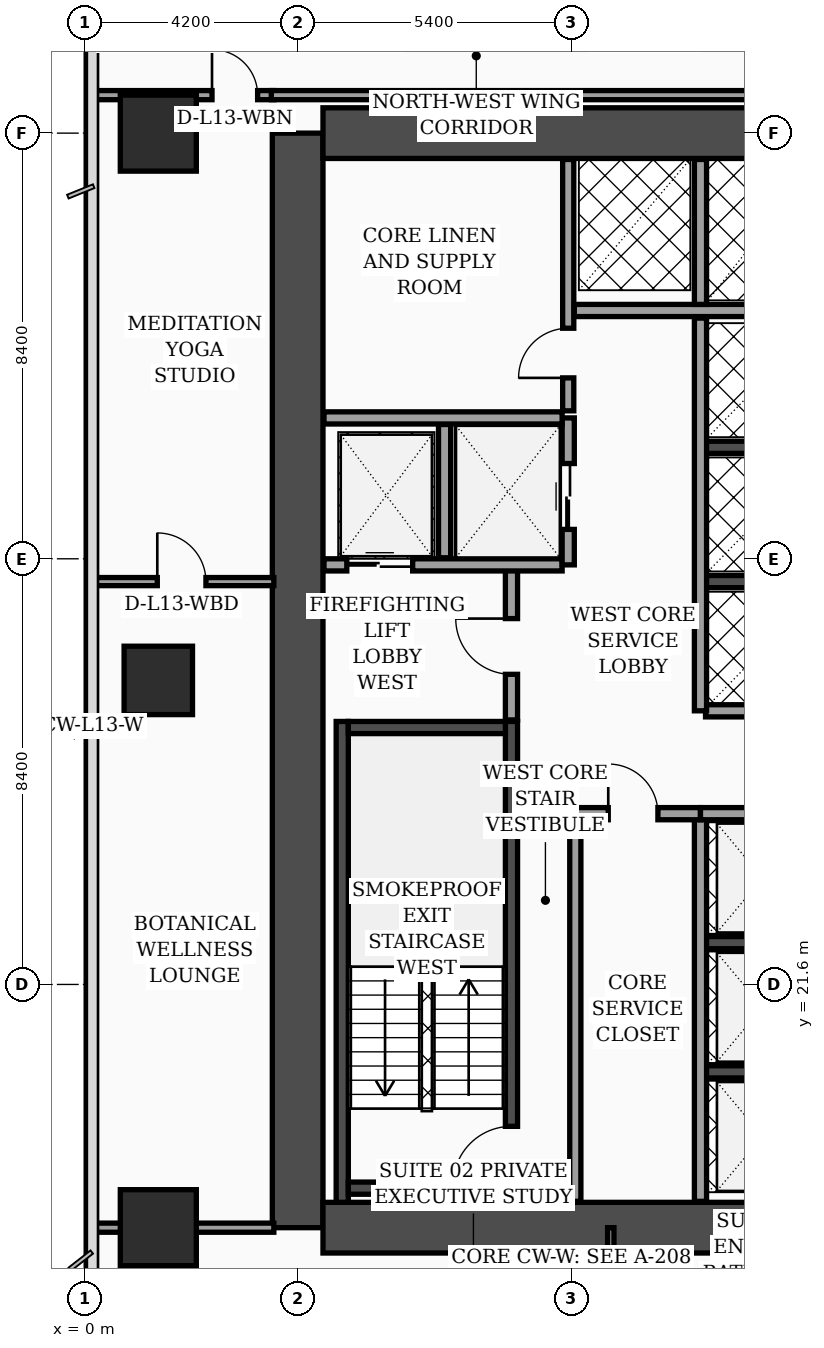
"""IFC4 building model, lengths in metres.
Left out: names, types, materials, properties, quantities, classifications, styles, units other than length and angle.
Written with IfcOpenShell. Run it as: python <this file> out.ifc"""

import sys

from ifc_helpers import new_model, si_unit, direction, frame, frame_2d, origin, origin_2d, place, context, subcontext, project, spatial, rectangle, extrude, element, fill, save


model = new_model("IFC4")
c1 = context("Model", 3, precision=1e-05, world=origin(), true_north=direction((0.0, 1.0)))
c2 = subcontext(c1, "Body", "Model", "MODEL_VIEW")
j1 = project(units=[si_unit("LENGTHUNIT", "METRE"), si_unit("PLANEANGLEUNIT", "RADIAN")], contexts=[c1])
p1 = place(None, origin())
s1 = spatial("IfcSite", under=j1, at=p1, CompositionType="ELEMENT")
p2 = place(p1, origin())
s2 = spatial("IfcBuilding", under=s1, at=p2, CompositionType="ELEMENT")
p3 = place(p2, frame((0.0, 0.0, 58.4)))
s3 = spatial("IfcBuildingStorey", under=s2, at=p3, CompositionType="ELEMENT", Elevation=58.4)
p4 = place(p3, frame((4.2, 16.8, 0.0), z_axis=(0.0, 0.0, 1.0), x_axis=(0.0, 1.0, 0.0)))
e1 = element("IfcWall", 1, at=p4, inside=s3, PredefinedType="SHEAR", context=c2, shape_type="SweptSolid", body=[
    extrude(rectangle(XDim=21.6, YDim=1.0, at=frame_2d((10.8, 0.0))), origin(), (0.0, 0.0, 1.0), 3.56),
])
for number, where, z_axis, x_axis in (
    (2, (4.7, 38.4, 0.0), (0.0, 0.0, 1.0), (1.0, 0.0, 0.0)),
    (3, (4.7, 16.8, 0.0), (0.0, 0.0, 1.0), (1.0, 0.0, 0.0)),
):
    element("IfcWall", number, at=place(p3, frame(where, z_axis=z_axis, x_axis=x_axis)), inside=s3, PredefinedType="SHEAR", context=c2, shape_type="SweptSolid", body=[
        extrude(rectangle(XDim=9.8, YDim=1.0, at=frame_2d((4.9, 0.0))), origin(), (0.0, 0.0, 1.0), 3.56),
    ])
p5 = place(p3, frame((5.08, 17.3, 0.0), z_axis=(0.0, 0.0, 1.0), x_axis=(0.0, 1.0, 0.0)))
e4 = element("IfcWall", 4, at=p5, inside=s3, PredefinedType="SOLIDWALL", context=c2, shape_type="SweptSolid", body=[
    extrude(rectangle(XDim=9.49, YDim=0.24, at=frame_2d((4.745, 0.0))), origin(), (0.0, 0.0, 1.0), 3.56),
])
p6 = place(p3, frame((8.42, 17.3, 0.0), z_axis=(0.0, 0.0, 1.0), x_axis=(0.0, 1.0, 0.0)))
e5 = element("IfcWall", 5, at=p6, inside=s3, PredefinedType="SOLIDWALL", context=c2, shape_type="SweptSolid", body=[
    extrude(rectangle(XDim=9.49, YDim=0.24, at=frame_2d((4.745, 0.0))), origin(), (0.0, 0.0, 1.0), 3.56),
])
p7 = place(p6, frame((0.35, 0.0, 0.0)))
e6 = element("IfcOpeningElement", 6, at=p7, cuts=e5, PredefinedType="OPENING", context=c2, shape_type="SweptSolid", body=[
    extrude(rectangle(XDim=1.15, YDim=2.2, at=frame_2d((0.575, 1.1))), frame((0.0, 0.13, 0.0), z_axis=(0.0, -1.0, 0.0), x_axis=(1.0, 0.0, 0.0)), (0.0, 0.0, 1.0), 0.26),
])
for number, where, z_axis, x_axis in (
    (7, (5.2, 17.58, 0.0), (0.0, 0.0, 1.0), (1.0, 0.0, 0.0)),
    (8, (5.2, 26.67, 0.0), (0.0, 0.0, 1.0), (1.0, 0.0, 0.0)),
):
    element("IfcWall", number, at=place(p3, frame(where, z_axis=z_axis, x_axis=x_axis)), inside=s3, PredefinedType="SOLIDWALL", context=c2, shape_type="SweptSolid", body=[
        extrude(rectangle(XDim=3.1, YDim=0.24, at=frame_2d((1.55, 0.0))), origin(), (0.0, 0.0, 1.0), 3.56),
    ])
for number, where, z_axis, x_axis in (
    (9, (12.18, 19.875, 0.0), (0.0, 0.0, 1.0), (1.0, 0.0, 0.0)),
    (10, (12.18, 22.425, 0.0), (0.0, 0.0, 1.0), (1.0, 0.0, 0.0)),
    (11, (12.18, 29.55, 0.0), (0.0, 0.0, 1.0), (1.0, 0.0, 0.0)),
    (12, (12.18, 32.2, 0.0), (0.0, 0.0, 1.0), (1.0, 0.0, 0.0)),
):
    element("IfcWall", number, at=place(p3, frame(where, z_axis=z_axis, x_axis=x_axis)), inside=s3, PredefinedType="SOLIDWALL", context=c2, shape_type="SweptSolid", body=[
        extrude(rectangle(XDim=2.32, YDim=0.24, at=frame_2d((1.16, 0.0))), origin(), (0.0, 0.0, 1.0), 3.56),
    ])
p8 = place(p3, frame((1.45, 16.8, 0.0), z_axis=(0.0, 0.0, 1.0), x_axis=(1.0, 0.0, 0.0)))
e13 = element("IfcColumn", 13, at=p8, inside=s3, PredefinedType="COLUMN", context=c2, shape_type="SweptSolid", body=[
    extrude(rectangle(XDim=1.5, YDim=1.5, at=origin_2d()), origin(), (0.0, 0.0, 1.0), 3.56),
])
p9 = place(p3, frame((1.45, 27.6, 0.0), z_axis=(0.0, 0.0, 1.0), x_axis=(1.0, 0.0, 0.0)))
e14 = element("IfcColumn", 14, at=p9, inside=s3, PredefinedType="COLUMN", context=c2, shape_type="SweptSolid", body=[
    extrude(rectangle(XDim=1.35, YDim=1.35, at=origin_2d()), origin(), (0.0, 0.0, 1.0), 3.56),
])
p10 = place(p3, frame((1.45, 38.4, 0.0), z_axis=(0.0, 0.0, 1.0), x_axis=(1.0, 0.0, 0.0)))
e15 = element("IfcColumn", 15, at=p10, inside=s3, PredefinedType="COLUMN", context=c2, shape_type="SweptSolid", body=[
    extrude(rectangle(XDim=1.5, YDim=1.5, at=origin_2d()), origin(), (0.0, 0.0, 1.0), 3.56),
])
p11 = place(p3, frame((8.42, 26.82, 0.0), z_axis=(0.0, 0.0, 1.0), x_axis=(0.0, 1.0, 0.0)))
e16 = element("IfcWall", 16, at=p11, inside=s3, PredefinedType="SOLIDWALL", context=c2, shape_type="SweptSolid", body=[
    extrude(rectangle(XDim=3.0, YDim=0.24, at=frame_2d((1.5, 0.0))), origin(), (0.0, 0.0, 1.0), 3.56),
])
p12 = place(p11, frame((0.9, 0.0, 0.0)))
e17 = element("IfcOpeningElement", 17, at=p12, cuts=e16, PredefinedType="OPENING", context=c2, shape_type="SweptSolid", body=[
    extrude(rectangle(XDim=1.1, YDim=2.2, at=frame_2d((0.55, 1.1))), frame((0.0, 0.13, 0.0), z_axis=(0.0, -1.0, 0.0), x_axis=(1.0, 0.0, 0.0)), (0.0, 0.0, 1.0), 0.26),
])
p13 = place(p3, frame((4.72, 29.88, 0.0), z_axis=(0.0, 0.0, 1.0), x_axis=(1.0, 0.0, 0.0)))
e18 = element("IfcWall", 18, at=p13, inside=s3, PredefinedType="SOLIDWALL", context=c2, shape_type="SweptSolid", body=[
    extrude(rectangle(XDim=4.7, YDim=0.24, at=frame_2d((2.35, 0.0))), origin(), (0.0, 0.0, 1.0), 3.56),
])
p14 = place(p13, frame((0.45, 0.0, 0.0)))
e19 = element("IfcOpeningElement", 19, at=p14, cuts=e18, PredefinedType="OPENING", context=c2, shape_type="SweptSolid", body=[
    extrude(rectangle(XDim=1.3, YDim=2.35, at=frame_2d((0.65, 1.175))), frame((0.0, 0.13, 0.0), z_axis=(0.0, -1.0, 0.0), x_axis=(1.0, 0.0, 0.0)), (0.0, 0.0, 1.0), 0.26),
])
p15 = place(p3, frame((7.1, 30.02, 0.0), z_axis=(0.0, 0.0, 1.0), x_axis=(0.0, 1.0, 0.0)))
e20 = element("IfcWall", 20, at=p15, inside=s3, PredefinedType="SOLIDWALL", context=c2, shape_type="SweptSolid", body=[
    extrude(rectangle(XDim=2.63, YDim=0.24, at=frame_2d((1.315, 0.0))), origin(), (0.0, 0.0, 1.0), 3.56),
])
p16 = place(p3, frame((9.54, 29.88, 0.0), z_axis=(0.0, 0.0, 1.0), x_axis=(0.0, 1.0, 0.0)))
e21 = element("IfcWall", 21, at=p16, inside=s3, PredefinedType="SOLIDWALL", context=c2, shape_type="SweptSolid", body=[
    extrude(rectangle(XDim=2.9, YDim=0.24, at=frame_2d((1.45, 0.0))), origin(), (0.0, 0.0, 1.0), 3.56),
])
p17 = place(p16, frame((0.7, 0.0, 0.0)))
e22 = element("IfcOpeningElement", 22, at=p17, cuts=e21, PredefinedType="OPENING", context=c2, shape_type="SweptSolid", body=[
    extrude(rectangle(XDim=1.3, YDim=2.35, at=frame_2d((0.65, 1.175))), frame((0.0, 0.13, 0.0), z_axis=(0.0, -1.0, 0.0), x_axis=(1.0, 0.0, 0.0)), (0.0, 0.0, 1.0), 0.26),
])
p18 = place(p3, frame((4.72, 32.78, 0.0), z_axis=(0.0, 0.0, 1.0), x_axis=(1.0, 0.0, 0.0)))
e23 = element("IfcWall", 23, at=p18, inside=s3, PredefinedType="SOLIDWALL", context=c2, shape_type="SweptSolid", body=[
    extrude(rectangle(XDim=4.7, YDim=0.24, at=frame_2d((2.35, 0.0))), origin(), (0.0, 0.0, 1.0), 3.56),
])
p19 = place(p3, frame((9.68, 17.32, 0.0), z_axis=(0.0, 0.0, 1.0), x_axis=(0.0, 1.0, 0.0)))
e24 = element("IfcWall", 24, at=p19, inside=s3, PredefinedType="SOLIDWALL", context=c2, shape_type="SweptSolid", body=[
    extrude(rectangle(XDim=7.68, YDim=0.22, at=frame_2d((3.84, 0.0))), origin(), (0.0, 0.0, 1.0), 3.56),
])
p20 = place(p3, frame((9.54, 32.92, 0.0), z_axis=(0.0, 0.0, 1.0), x_axis=(0.0, 1.0, 0.0)))
e25 = element("IfcWall", 25, at=p20, inside=s3, PredefinedType="SOLIDWALL", context=c2, shape_type="SweptSolid", body=[
    extrude(rectangle(XDim=4.96, YDim=0.22, at=frame_2d((2.48, 0.0))), origin(), (0.0, 0.0, 1.0), 3.56),
])
p21 = place(p20, frame((0.65, 0.0, 0.0)))
e26 = element("IfcOpeningElement", 26, at=p21, cuts=e25, PredefinedType="OPENING", context=c2, shape_type="SweptSolid", body=[
    extrude(rectangle(XDim=0.98, YDim=2.15, at=frame_2d((0.49, 1.075))), frame((0.0, 0.12, 0.0), z_axis=(0.0, -1.0, 0.0), x_axis=(1.0, 0.0, 0.0)), (0.0, 0.0, 1.0), 0.24),
])
p22 = place(p3, frame((12.15, 17.32, 0.0), z_axis=(0.0, 0.0, 1.0), x_axis=(0.0, 1.0, 0.0)))
e27 = element("IfcWall", 27, at=p22, inside=s3, PredefinedType="SOLIDWALL", context=c2, shape_type="SweptSolid", body=[
    extrude(rectangle(XDim=7.65, YDim=0.24, at=frame_2d((3.825, 0.0))), origin(), (0.0, 0.0, 1.0), 3.56),
])
p23 = place(p3, frame((9.68, 24.97, 0.0), z_axis=(0.0, 0.0, 1.0), x_axis=(1.0, 0.0, 0.0)))
e28 = element("IfcWall", 28, at=p23, inside=s3, PredefinedType="SOLIDWALL", context=c2, shape_type="SweptSolid", body=[
    extrude(rectangle(XDim=2.47, YDim=0.24, at=frame_2d((1.235, 0.0))), origin(), (0.0, 0.0, 1.0), 3.56),
])
p24 = place(p23, frame((0.65, 0.0, 0.0)))
e29 = element("IfcOpeningElement", 29, at=p24, cuts=e28, PredefinedType="OPENING", context=c2, shape_type="SweptSolid", body=[
    extrude(rectangle(XDim=0.98, YDim=2.15, at=frame_2d((0.49, 1.075))), frame((0.0, 0.13, 0.0), z_axis=(0.0, -1.0, 0.0), x_axis=(1.0, 0.0, 0.0)), (0.0, 0.0, 1.0), 0.26),
])
p25 = place(p3, frame((12.15, 24.97, 0.0), z_axis=(0.0, 0.0, 1.0), x_axis=(1.0, 0.0, 0.0)))
e30 = element("IfcWall", 30, at=p25, inside=s3, PredefinedType="SOLIDWALL", context=c2, shape_type="SweptSolid", body=[
    extrude(rectangle(XDim=2.33, YDim=0.24, at=frame_2d((1.165, 0.0))), origin(), (0.0, 0.0, 1.0), 2.84),
])
p26 = place(p3, frame((12.25, 27.0, 0.0), z_axis=(0.0, 0.0, 1.0), x_axis=(1.0, 0.0, 0.0)))
e31 = element("IfcWall", 31, at=p26, inside=s3, PredefinedType="SOLIDWALL", context=c2, shape_type="SweptSolid", body=[
    extrude(rectangle(XDim=2.23, YDim=0.24, at=frame_2d((1.115, 0.0))), origin(), (0.0, 0.0, 1.0), 3.56),
])
p27 = place(p3, frame((12.15, 27.0, 0.0), z_axis=(0.0, 0.0, 1.0), x_axis=(0.0, 1.0, 0.0)))
e32 = element("IfcWall", 32, at=p27, inside=s3, PredefinedType="SOLIDWALL", context=c2, shape_type="SweptSolid", body=[
    extrude(rectangle(XDim=7.75, YDim=0.24, at=frame_2d((3.875, 0.0))), origin(), (0.0, 0.0, 1.0), 3.56),
])
p28 = place(p3, frame((9.66, 34.9, 0.0), z_axis=(0.0, 0.0, 1.0), x_axis=(1.0, 0.0, 0.0)))
e33 = element("IfcWall", 33, at=p28, inside=s3, PredefinedType="SOLIDWALL", context=c2, shape_type="SweptSolid", body=[
    extrude(rectangle(XDim=4.82, YDim=0.24, at=frame_2d((2.41, 0.0))), origin(), (0.0, 0.0, 1.0), 3.56),
])
p29 = place(p3, frame((12.15, 35.02, 0.0), z_axis=(0.0, 0.0, 1.0), x_axis=(0.0, 1.0, 0.0)))
e34 = element("IfcWall", 34, at=p29, inside=s3, PredefinedType="SOLIDWALL", context=c2, shape_type="SweptSolid", body=[
    extrude(rectangle(XDim=2.86, YDim=0.24, at=frame_2d((1.43, 0.0))), origin(), (0.0, 0.0, 1.0), 3.56),
])
p30 = place(p3, frame((0.08, 29.55, 0.0), z_axis=(0.0, 0.0, 1.0), x_axis=(1.0, 0.0, 0.0)))
e35 = element("IfcWall", 35, at=p30, inside=s3, PredefinedType="PARTITIONING", context=c2, shape_type="SweptSolid", body=[
    extrude(rectangle(XDim=3.65, YDim=0.16, at=frame_2d((1.825, 0.0))), origin(), (0.0, 0.0, 1.0), 3.04),
])
p31 = place(p30, frame((1.35, 0.0, 0.0)))
e36 = element("IfcOpeningElement", 36, at=p31, cuts=e35, PredefinedType="OPENING", context=c2, shape_type="SweptSolid", body=[
    extrude(rectangle(XDim=0.96, YDim=2.2, at=frame_2d((0.48, 1.1))), frame((0.0, 0.09, 0.0), z_axis=(0.0, -1.0, 0.0), x_axis=(1.0, 0.0, 0.0)), (0.0, 0.0, 1.0), 0.18),
])
p32 = place(p3, frame((0.08, 16.8, 0.0), z_axis=(0.0, 0.0, 1.0), x_axis=(1.0, 0.0, 0.0)))
e37 = element("IfcWall", 37, at=p32, inside=s3, PredefinedType="PARTITIONING", context=c2, shape_type="SweptSolid", body=[
    extrude(rectangle(XDim=3.65, YDim=0.18, at=frame_2d((1.825, 0.0))), origin(), (0.0, 0.0, 1.0), 2.84),
])
p33 = place(p3, frame((0.08, 39.15, 0.0), z_axis=(0.0, 0.0, 1.0), x_axis=(1.0, 0.0, 0.0)))
e38 = element("IfcWall", 38, at=p33, inside=s3, PredefinedType="PARTITIONING", context=c2, shape_type="SweptSolid", body=[
    extrude(rectangle(XDim=3.65, YDim=0.18, at=frame_2d((1.825, 0.0))), origin(), (0.0, 0.0, 1.0), 2.84),
])
p34 = place(p33, frame((2.43, 0.0, 0.0)))
e39 = element("IfcOpeningElement", 39, at=p34, cuts=e38, PredefinedType="OPENING", context=c2, shape_type="SweptSolid", body=[
    extrude(rectangle(XDim=0.9, YDim=2.15, at=frame_2d((0.45, 1.075))), frame((0.0, 0.1, 0.0), z_axis=(0.0, -1.0, 0.0), x_axis=(1.0, 0.0, 0.0)), (0.0, 0.0, 1.0), 0.2),
])
p35 = place(p3, frame((10.38, 14.75, 0.0), z_axis=(0.0, 0.0, 1.0), x_axis=(0.0, 1.0, 0.0)))
e40 = element("IfcWall", 40, at=p35, inside=s3, PredefinedType="PARTITIONING", context=c2, shape_type="SweptSolid", body=[
    extrude(rectangle(XDim=2.05, YDim=0.125, at=frame_2d((1.025, 0.0))), origin(), (0.0, 0.0, 1.0), 3.56),
])
p36 = place(p3, frame((3.68, 39.15, 0.0), z_axis=(0.0, 0.0, 1.0), x_axis=(1.0, 0.0, 0.0)))
e41 = element("IfcWall", 41, at=p36, inside=s3, PredefinedType="PARTITIONING", context=c2, shape_type="SweptSolid", body=[
    extrude(rectangle(XDim=11.47, YDim=0.18, at=frame_2d((5.735, 0.0))), origin(), (0.0, 0.0, 1.0), 2.84),
])
p37 = place(p12, origin())
e42 = element("IfcDoor", 42, at=p37, inside=s3, OperationType="SINGLE_SWING_RIGHT", PredefinedType="DOOR", context=c2, shape_type="SweptSolid", body=[
    extrude(rectangle(XDim=1.1, YDim=2.2, at=frame_2d((0.55, 1.1))), frame((0.0, 0.025, 0.0), z_axis=(0.0, -1.0, 0.0), x_axis=(1.0, 0.0, 0.0)), (0.0, 0.0, 1.0), 0.05),
])
fill(e17, e42)
p38 = place(p14, origin())
e43 = element("IfcDoor", 43, at=p38, inside=s3, OperationType="DOUBLE_DOOR_SLIDING", PredefinedType="DOOR", context=c2, shape_type="SweptSolid", body=[
    extrude(rectangle(XDim=1.3, YDim=2.35, at=frame_2d((0.65, 1.175))), frame((0.0, 0.025, 0.0), z_axis=(0.0, -1.0, 0.0), x_axis=(1.0, 0.0, 0.0)), (0.0, 0.0, 1.0), 0.05),
])
fill(e19, e43)
p39 = place(p17, origin())
e44 = element("IfcDoor", 44, at=p39, inside=s3, OperationType="DOUBLE_DOOR_SLIDING", PredefinedType="DOOR", context=c2, shape_type="SweptSolid", body=[
    extrude(rectangle(XDim=1.3, YDim=2.35, at=frame_2d((0.65, 1.175))), frame((0.0, 0.025, 0.0), z_axis=(0.0, -1.0, 0.0), x_axis=(1.0, 0.0, 0.0)), (0.0, 0.0, 1.0), 0.05),
])
fill(e22, e44)
p40 = place(p21, origin())
e45 = element("IfcDoor", 45, at=p40, inside=s3, OperationType="SINGLE_SWING_LEFT", PredefinedType="DOOR", context=c2, shape_type="SweptSolid", body=[
    extrude(rectangle(XDim=0.98, YDim=2.15, at=frame_2d((0.49, 1.075))), frame((0.0, 0.025, 0.0), z_axis=(0.0, -1.0, 0.0), x_axis=(1.0, 0.0, 0.0)), (0.0, 0.0, 1.0), 0.05),
])
fill(e26, e45)
p41 = place(p24, origin())
e46 = element("IfcDoor", 46, at=p41, inside=s3, OperationType="SINGLE_SWING_LEFT", PredefinedType="DOOR", context=c2, shape_type="SweptSolid", body=[
    extrude(rectangle(XDim=0.98, YDim=2.15, at=frame_2d((0.49, 1.075))), frame((0.0, 0.025, 0.0), z_axis=(0.0, -1.0, 0.0), x_axis=(1.0, 0.0, 0.0)), (0.0, 0.0, 1.0), 0.05),
])
fill(e29, e46)
p42 = place(p31, origin())
e47 = element("IfcDoor", 47, at=p42, inside=s3, OperationType="SINGLE_SWING_LEFT", PredefinedType="DOOR", context=c2, shape_type="SweptSolid", body=[
    extrude(rectangle(XDim=0.96, YDim=2.2, at=frame_2d((0.48, 1.1))), frame((0.0, 0.025, 0.0), z_axis=(0.0, -1.0, 0.0), x_axis=(1.0, 0.0, 0.0)), (0.0, 0.0, 1.0), 0.05),
])
fill(e36, e47)
p43 = place(p34, origin())
e48 = element("IfcDoor", 48, at=p43, inside=s3, OperationType="SINGLE_SWING_LEFT", PredefinedType="DOOR", context=c2, shape_type="SweptSolid", body=[
    extrude(rectangle(XDim=0.9, YDim=2.15, at=frame_2d((0.45, 1.075))), frame((0.0, 0.025, 0.0), z_axis=(0.0, -1.0, 0.0), x_axis=(1.0, 0.0, 0.0)), (0.0, 0.0, 1.0), 0.05),
])
fill(e39, e48)
p44 = place(p7, origin())
e49 = element("IfcDoor", 49, at=p44, inside=s3, OperationType="SINGLE_SWING_LEFT", PredefinedType="DOOR", context=c2, shape_type="SweptSolid", body=[
    extrude(rectangle(XDim=1.15, YDim=2.2, at=frame_2d((0.575, 1.1))), frame((0.0, 0.025, 0.0), z_axis=(0.0, -1.0, 0.0), x_axis=(1.0, 0.0, 0.0)), (0.0, 0.0, 1.0), 0.05),
])
fill(e6, e49)
save(model, sys.argv[1])
